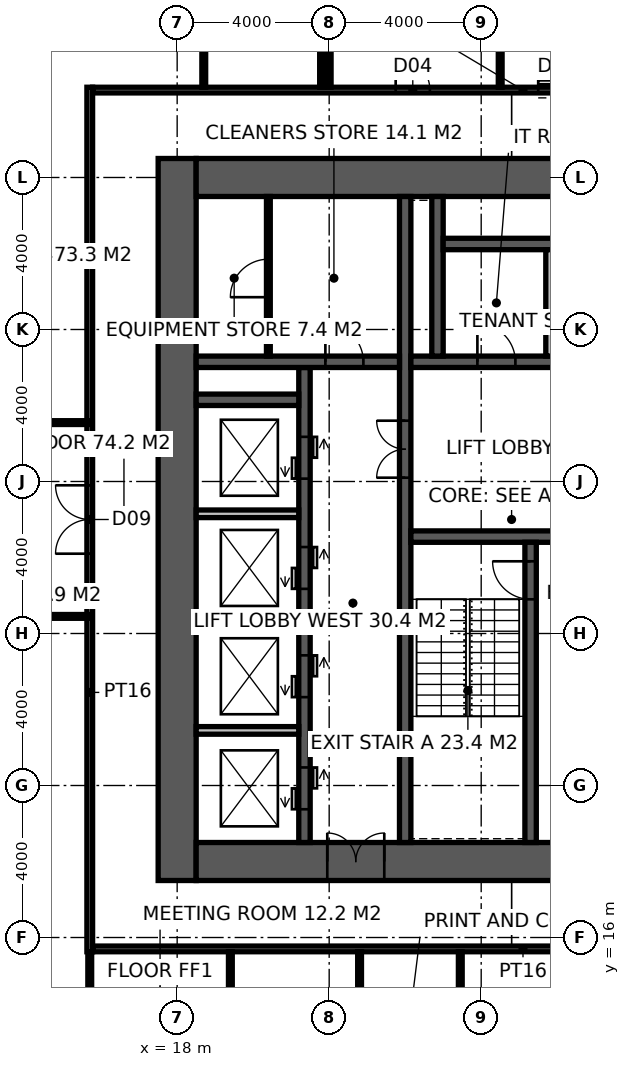
"""IFC4 building model, lengths in metres.
Left out: names, types, materials, properties, quantities, classifications, styles, units other than length and angle.
Written with IfcOpenShell. Run it as: python <this file> out.ifc"""

import sys

from ifc_helpers import new_model, si_unit, direction, frame, frame_2d, origin, place, context, subcontext, project, spatial, rectangle, extrude, element, fill, save


model = new_model("IFC4")
c1 = context("Model", 3, precision=1e-05, world=origin(), true_north=direction((0.0, 1.0)))
c2 = subcontext(c1, "Body", "Model", "MODEL_VIEW")
j1 = project(units=[si_unit("LENGTHUNIT", "METRE"), si_unit("PLANEANGLEUNIT", "RADIAN")], contexts=[c1])
p1 = place(None, origin())
s1 = spatial("IfcSite", under=j1, at=p1, CompositionType="ELEMENT")
p2 = place(p1, origin())
s2 = spatial("IfcBuilding", under=s1, at=p2, CompositionType="ELEMENT")
p3 = place(p2, frame((0.0, 0.0, 226.2)))
s3 = spatial("IfcBuildingStorey", under=s2, at=p3, CompositionType="ELEMENT", Elevation=226.2)
p4 = place(p3, frame((18.0, 17.5, -0.15), z_axis=(0.0, 0.0, 1.0), x_axis=(0.0, 1.0, 0.0)))
e1 = element("IfcWall", 1, at=p4, inside=s3, PredefinedType="SHEAR", context=c2, shape_type="SweptSolid", body=[
    extrude(rectangle(XDim=19.0, YDim=1.0, at=frame_2d((9.5, 0.0))), origin(), (0.0, 0.0, 1.0), 4.0),
])
p5 = place(p3, frame((18.5, 18.0, -0.15), z_axis=(0.0, 0.0, 1.0), x_axis=(1.0, 0.0, 0.0)))
e2 = element("IfcWall", 2, at=p5, inside=s3, PredefinedType="SHEAR", context=c2, shape_type="SweptSolid", body=[
    extrude(rectangle(XDim=17.6, YDim=1.0, at=frame_2d((8.8, 0.0))), origin(), (0.0, 0.0, 1.0), 4.0),
])
p6 = place(p5, frame((3.45, 0.0, 0.15)))
e3 = element("IfcOpeningElement", 3, at=p6, cuts=e2, PredefinedType="OPENING", context=c2, shape_type="SweptSolid", body=[
    extrude(rectangle(XDim=1.5, YDim=2.4, at=frame_2d((0.75, 1.2))), frame((0.0, 0.51, 0.0), z_axis=(0.0, -1.0, 0.0), x_axis=(1.0, 0.0, 0.0)), (0.0, 0.0, 1.0), 1.02),
])
p7 = place(p3, frame((18.5, 36.0, -0.15), z_axis=(0.0, 0.0, 1.0), x_axis=(1.0, 0.0, 0.0)))
e4 = element("IfcWall", 4, at=p7, inside=s3, PredefinedType="SHEAR", context=c2, shape_type="SweptSolid", body=[
    extrude(rectangle(XDim=17.6, YDim=1.0, at=frame_2d((8.8, 0.0))), origin(), (0.0, 0.0, 1.0), 4.0),
])
p8 = place(p3, frame((24.0, 18.5, -0.15), z_axis=(0.0, 0.0, 1.0), x_axis=(0.0, 1.0, 0.0)))
e5 = element("IfcWall", 5, at=p8, inside=s3, PredefinedType="SHEAR", context=c2, shape_type="SweptSolid", body=[
    extrude(rectangle(XDim=17.0, YDim=0.3, at=frame_2d((8.5, 0.0))), origin(), (0.0, 0.0, 1.0), 4.0),
])
p9 = place(p8, frame((9.6, 0.0, 0.15)))
e6 = element("IfcOpeningElement", 6, at=p9, cuts=e5, PredefinedType="OPENING", context=c2, shape_type="SweptSolid", body=[
    extrude(rectangle(XDim=1.5, YDim=2.4, at=frame_2d((0.75, 1.2))), frame((0.0, 0.16, 0.0), z_axis=(0.0, -1.0, 0.0), x_axis=(1.0, 0.0, 0.0)), (0.0, 0.0, 1.0), 0.32),
])
p10 = place(p3, frame((24.15, 26.55, -0.15), z_axis=(0.0, 0.0, 1.0), x_axis=(1.0, 0.0, 0.0)))
e7 = element("IfcWall", 7, at=p10, inside=s3, PredefinedType="SHEAR", context=c2, shape_type="SweptSolid", body=[
    extrude(rectangle(XDim=11.25, YDim=0.3, at=frame_2d((5.625, 0.0))), origin(), (0.0, 0.0, 1.0), 4.0),
])
p11 = place(p10, frame((9.25, 0.0, 0.15)))
e8 = element("IfcOpeningElement", 8, at=p11, cuts=e7, PredefinedType="OPENING", context=c2, shape_type="SweptSolid", body=[
    extrude(rectangle(XDim=1.0, YDim=2.2, at=frame_2d((0.5, 1.1))), frame((0.0, 0.16, 0.0), z_axis=(0.0, -1.0, 0.0), x_axis=(1.0, 0.0, 0.0)), (0.0, 0.0, 1.0), 0.32),
])
p12 = place(p10, frame((4.9, 0.0, 0.15)))
e9 = element("IfcOpeningElement", 9, at=p12, cuts=e7, PredefinedType="OPENING", context=c2, shape_type="SweptSolid", body=[
    extrude(rectangle(XDim=1.5, YDim=2.4, at=frame_2d((0.75, 1.2))), frame((0.0, 0.16, 0.0), z_axis=(0.0, -1.0, 0.0), x_axis=(1.0, 0.0, 0.0)), (0.0, 0.0, 1.0), 0.32),
])
p13 = place(p3, frame((27.3, 18.5, -0.15), z_axis=(0.0, 0.0, 1.0), x_axis=(0.0, 1.0, 0.0)))
e10 = element("IfcWall", 10, at=p13, inside=s3, PredefinedType="SHEAR", context=c2, shape_type="SweptSolid", body=[
    extrude(rectangle(XDim=7.9, YDim=0.3, at=frame_2d((3.95, 0.0))), origin(), (0.0, 0.0, 1.0), 4.0),
])
p14 = place(p13, frame((6.4, 0.0, 0.15)))
e11 = element("IfcOpeningElement", 11, at=p14, cuts=e10, PredefinedType="OPENING", context=c2, shape_type="SweptSolid", body=[
    extrude(rectangle(XDim=1.0, YDim=2.2, at=frame_2d((0.5, 1.1))), frame((0.0, 0.16, 0.0), z_axis=(0.0, -1.0, 0.0), x_axis=(1.0, 0.0, 0.0)), (0.0, 0.0, 1.0), 0.32),
])
p15 = place(p3, frame((24.15, 31.15, -0.15), z_axis=(0.0, 0.0, 1.0), x_axis=(1.0, 0.0, 0.0)))
e12 = element("IfcWall", 12, at=p15, inside=s3, PredefinedType="SHEAR", context=c2, shape_type="SweptSolid", body=[
    extrude(rectangle(XDim=11.25, YDim=0.3, at=frame_2d((5.625, 0.0))), origin(), (0.0, 0.0, 1.0), 4.0),
])
p16 = place(p15, frame((1.75, 0.0, 0.15)))
e13 = element("IfcOpeningElement", 13, at=p16, cuts=e12, PredefinedType="OPENING", context=c2, shape_type="SweptSolid", body=[
    extrude(rectangle(XDim=1.0, YDim=2.2, at=frame_2d((0.5, 1.1))), frame((0.0, 0.16, 0.0), z_axis=(0.0, -1.0, 0.0), x_axis=(1.0, 0.0, 0.0)), (0.0, 0.0, 1.0), 0.32),
])
p17 = place(p15, frame((4.55, 0.0, 0.15)))
e14 = element("IfcOpeningElement", 14, at=p17, cuts=e12, PredefinedType="OPENING", context=c2, shape_type="SweptSolid", body=[
    extrude(rectangle(XDim=1.0, YDim=2.2, at=frame_2d((0.5, 1.1))), frame((0.0, 0.16, 0.0), z_axis=(0.0, -1.0, 0.0), x_axis=(1.0, 0.0, 0.0)), (0.0, 0.0, 1.0), 0.32),
])
p18 = place(p15, frame((7.25, 0.0, 0.15)))
e15 = element("IfcOpeningElement", 15, at=p18, cuts=e12, PredefinedType="OPENING", context=c2, shape_type="SweptSolid", body=[
    extrude(rectangle(XDim=1.4, YDim=2.4, at=frame_2d((0.7, 1.2))), frame((0.0, 0.16, 0.0), z_axis=(0.0, -1.0, 0.0), x_axis=(1.0, 0.0, 0.0)), (0.0, 0.0, 1.0), 0.32),
])
p19 = place(p3, frame((21.35, 18.5, -0.15), z_axis=(0.0, 0.0, 1.0), x_axis=(0.0, 1.0, 0.0)))
e16 = element("IfcWall", 16, at=p19, inside=s3, PredefinedType="SHEAR", context=c2, shape_type="SweptSolid", body=[
    extrude(rectangle(XDim=12.5, YDim=0.3, at=frame_2d((6.25, 0.0))), origin(), (0.0, 0.0, 1.0), 4.0),
])
p20 = place(p19, frame((0.875, 0.0, 0.15)))
e17 = element("IfcOpeningElement", 17, at=p20, cuts=e16, PredefinedType="OPENING", context=c2, shape_type="SweptSolid", body=[
    extrude(rectangle(XDim=1.1, YDim=2.2, at=frame_2d((0.55, 1.1))), frame((0.0, 0.16, 0.0), z_axis=(0.0, -1.0, 0.0), x_axis=(1.0, 0.0, 0.0)), (0.0, 0.0, 1.0), 0.32),
])
p21 = place(p19, frame((3.825, 0.0, 0.15)))
e18 = element("IfcOpeningElement", 18, at=p21, cuts=e16, PredefinedType="OPENING", context=c2, shape_type="SweptSolid", body=[
    extrude(rectangle(XDim=1.1, YDim=2.2, at=frame_2d((0.55, 1.1))), frame((0.0, 0.16, 0.0), z_axis=(0.0, -1.0, 0.0), x_axis=(1.0, 0.0, 0.0)), (0.0, 0.0, 1.0), 0.32),
])
p22 = place(p19, frame((6.675, 0.0, 0.15)))
e19 = element("IfcOpeningElement", 19, at=p22, cuts=e16, PredefinedType="OPENING", context=c2, shape_type="SweptSolid", body=[
    extrude(rectangle(XDim=1.1, YDim=2.2, at=frame_2d((0.55, 1.1))), frame((0.0, 0.16, 0.0), z_axis=(0.0, -1.0, 0.0), x_axis=(1.0, 0.0, 0.0)), (0.0, 0.0, 1.0), 0.32),
])
p23 = place(p19, frame((9.575, 0.0, 0.15)))
e20 = element("IfcOpeningElement", 20, at=p23, cuts=e16, PredefinedType="OPENING", context=c2, shape_type="SweptSolid", body=[
    extrude(rectangle(XDim=1.1, YDim=2.2, at=frame_2d((0.55, 1.1))), frame((0.0, 0.16, 0.0), z_axis=(0.0, -1.0, 0.0), x_axis=(1.0, 0.0, 0.0)), (0.0, 0.0, 1.0), 0.32),
])
p24 = place(p3, frame((18.5, 31.15, -0.15), z_axis=(0.0, 0.0, 1.0), x_axis=(1.0, 0.0, 0.0)))
e21 = element("IfcWall", 21, at=p24, inside=s3, PredefinedType="SHEAR", context=c2, shape_type="SweptSolid", body=[
    extrude(rectangle(XDim=5.35, YDim=0.3, at=frame_2d((2.675, 0.0))), origin(), (0.0, 0.0, 1.0), 4.0),
])
p25 = place(p24, frame((3.4, 0.0, 0.15)))
e22 = element("IfcOpeningElement", 22, at=p25, cuts=e21, PredefinedType="OPENING", context=c2, shape_type="SweptSolid", body=[
    extrude(rectangle(XDim=1.0, YDim=2.2, at=frame_2d((0.5, 1.1))), frame((0.0, 0.16, 0.0), z_axis=(0.0, -1.0, 0.0), x_axis=(1.0, 0.0, 0.0)), (0.0, 0.0, 1.0), 0.32),
])
p26 = place(p3, frame((18.5, 30.15, -0.15), z_axis=(0.0, 0.0, 1.0), x_axis=(1.0, 0.0, 0.0)))
e23 = element("IfcWall", 23, at=p26, inside=s3, PredefinedType="SHEAR", context=c2, shape_type="SweptSolid", body=[
    extrude(rectangle(XDim=2.7, YDim=0.3, at=frame_2d((1.35, 0.0))), origin(), (0.0, 0.0, 1.0), 4.0),
])
p27 = place(p3, frame((24.85, 31.3, -0.15), z_axis=(0.0, 0.0, 1.0), x_axis=(0.0, 1.0, 0.0)))
e24 = element("IfcWall", 24, at=p27, inside=s3, PredefinedType="SHEAR", context=c2, shape_type="SweptSolid", body=[
    extrude(rectangle(XDim=4.2, YDim=0.3, at=frame_2d((2.1, 0.0))), origin(), (0.0, 0.0, 1.0), 4.0),
])
p28 = place(p3, frame((25.0, 34.25, -0.15), z_axis=(0.0, 0.0, 1.0), x_axis=(1.0, 0.0, 0.0)))
e25 = element("IfcWall", 25, at=p28, inside=s3, PredefinedType="SHEAR", context=c2, shape_type="SweptSolid", body=[
    extrude(rectangle(XDim=8.6, YDim=0.3, at=frame_2d((4.3, 0.0))), origin(), (0.0, 0.0, 1.0), 4.0),
])
p29 = place(p3, frame((27.8, 31.3, 0.0), z_axis=(0.0, 0.0, 1.0), x_axis=(0.0, 1.0, 0.0)))
e26 = element("IfcWall", 26, at=p29, inside=s3, PredefinedType="SOLIDWALL", context=c2, shape_type="SweptSolid", body=[
    extrude(rectangle(XDim=2.8, YDim=0.2, at=frame_2d((1.4, 0.0))), origin(), (0.0, 0.0, 1.0), 3.85),
])
for number, where, z_axis, x_axis in (
    (27, (18.5, 21.45, -0.15), (0.0, 0.0, 1.0), (1.0, 0.0, 0.0)),
    (28, (18.5, 24.3, -0.15), (0.0, 0.0, 1.0), (1.0, 0.0, 0.0)),
    (29, (18.5, 27.15, -0.15), (0.0, 0.0, 1.0), (1.0, 0.0, 0.0)),
):
    element("IfcWall", number, at=place(p3, frame(where, z_axis=z_axis, x_axis=x_axis)), inside=s3, PredefinedType="SOLIDWALL", context=c2, shape_type="SweptSolid", body=[
        extrude(rectangle(XDim=2.7, YDim=0.2, at=frame_2d((1.35, 0.0))), origin(), (0.0, 0.0, 1.0), 4.0),
    ])
p30 = place(p3, frame((20.4, 31.3, 0.0), z_axis=(0.0, 0.0, 1.0), x_axis=(0.0, 1.0, 0.0)))
e30 = element("IfcWall", 30, at=p30, inside=s3, PredefinedType="PARTITIONING", context=c2, shape_type="SweptSolid", body=[
    extrude(rectangle(XDim=4.2, YDim=0.1, at=frame_2d((2.1, 0.0))), origin(), (0.0, 0.0, 1.0), 3.85),
])
p31 = place(p30, frame((1.55, 0.0, 0.0)))
e31 = element("IfcOpeningElement", 31, at=p31, cuts=e30, PredefinedType="OPENING", context=c2, shape_type="SweptSolid", body=[
    extrude(rectangle(XDim=1.0, YDim=2.2, at=frame_2d((0.5, 1.1))), frame((0.0, 0.06, 0.0), z_axis=(0.0, -1.0, 0.0), x_axis=(1.0, 0.0, 0.0)), (0.0, 0.0, 1.0), 0.12),
])
p32 = place(p3, frame((15.7, 15.625, 0.0), z_axis=(0.0, 0.0, 1.0), x_axis=(0.0, 1.0, 0.0)))
e32 = element("IfcWall", 32, at=p32, inside=s3, PredefinedType="PARTITIONING", context=c2, shape_type="SweptSolid", body=[
    extrude(rectangle(XDim=22.75, YDim=0.15, at=frame_2d((11.375, 0.0))), origin(), (0.0, 0.0, 1.0), 3.85),
])
p33 = place(p32, frame((10.475, 0.0, 0.0)))
e33 = element("IfcOpeningElement", 33, at=p33, cuts=e32, PredefinedType="OPENING", context=c2, shape_type="SweptSolid", body=[
    extrude(rectangle(XDim=1.8, YDim=2.4, at=frame_2d((0.9, 1.2))), frame((0.0, 0.085, 0.0), z_axis=(0.0, -1.0, 0.0), x_axis=(1.0, 0.0, 0.0)), (0.0, 0.0, 1.0), 0.17),
])
p34 = place(p3, frame((15.775, 15.7, 0.0), z_axis=(0.0, 0.0, 1.0), x_axis=(1.0, 0.0, 0.0)))
e34 = element("IfcWall", 34, at=p34, inside=s3, PredefinedType="PARTITIONING", context=c2, shape_type="SweptSolid", body=[
    extrude(rectangle(XDim=22.65, YDim=0.15, at=frame_2d((11.325, 0.0))), origin(), (0.0, 0.0, 1.0), 3.85),
])
p35 = place(p3, frame((15.775, 38.3, 0.0), z_axis=(0.0, 0.0, 1.0), x_axis=(1.0, 0.0, 0.0)))
e35 = element("IfcWall", 35, at=p35, inside=s3, PredefinedType="PARTITIONING", context=c2, shape_type="SweptSolid", body=[
    extrude(rectangle(XDim=22.65, YDim=0.15, at=frame_2d((11.325, 0.0))), origin(), (0.0, 0.0, 1.0), 3.85),
])
p36 = place(p35, frame((7.975, 0.0, 0.0)))
e36 = element("IfcOpeningElement", 36, at=p36, cuts=e35, PredefinedType="OPENING", context=c2, shape_type="SweptSolid", body=[
    extrude(rectangle(XDim=0.9, YDim=2.1, at=frame_2d((0.45, 1.05))), frame((0.0, 0.085, 0.0), z_axis=(0.0, -1.0, 0.0), x_axis=(1.0, 0.0, 0.0)), (0.0, 0.0, 1.0), 0.17),
])
p37 = place(p35, frame((11.725, 0.0, 0.0)))
e37 = element("IfcOpeningElement", 37, at=p37, cuts=e35, PredefinedType="OPENING", context=c2, shape_type="SweptSolid", body=[
    extrude(rectangle(XDim=1.0, YDim=2.1, at=frame_2d((0.5, 1.05))), frame((0.0, 0.085, 0.0), z_axis=(0.0, -1.0, 0.0), x_axis=(1.0, 0.0, 0.0)), (0.0, 0.0, 1.0), 0.17),
])
p38 = place(p35, frame((15.575, 0.0, 0.0)))
e38 = element("IfcOpeningElement", 38, at=p38, cuts=e35, PredefinedType="OPENING", context=c2, shape_type="SweptSolid", body=[
    extrude(rectangle(XDim=0.9, YDim=2.1, at=frame_2d((0.45, 1.05))), frame((0.0, 0.085, 0.0), z_axis=(0.0, -1.0, 0.0), x_axis=(1.0, 0.0, 0.0)), (0.0, 0.0, 1.0), 0.17),
])
p39 = place(p3, frame((22.0, 38.375, 0.0), z_axis=(0.0, 0.0, 1.0), x_axis=(0.0, 1.0, 0.0)))
e39 = element("IfcWall", 39, at=p39, inside=s3, PredefinedType="PARTITIONING", context=c2, shape_type="SweptSolid", body=[
    extrude(rectangle(XDim=3.675, YDim=0.1, at=frame_2d((1.837, 0.0))), origin(), (0.0, 0.0, 1.0), 2.95),
])
p40 = place(p3, frame((26.5, 38.375, 0.0), z_axis=(0.0, 0.0, 1.0), x_axis=(0.0, 1.0, 0.0)))
e40 = element("IfcWall", 40, at=p40, inside=s3, PredefinedType="PARTITIONING", context=c2, shape_type="SweptSolid", body=[
    extrude(rectangle(XDim=3.575, YDim=0.1, at=frame_2d((1.788, 0.0))), origin(), (0.0, 0.0, 1.0), 3.85),
])
p41 = place(p3, frame((15.7, 12.15, 0.0), z_axis=(0.0, 0.0, 1.0), x_axis=(0.0, 1.0, 0.0)))
e41 = element("IfcWall", 41, at=p41, inside=s3, PredefinedType="PARTITIONING", context=c2, shape_type="SweptSolid", body=[
    extrude(rectangle(XDim=3.475, YDim=0.1, at=frame_2d((1.738, 0.0))), origin(), (0.0, 0.0, 1.0), 3.85),
])
p42 = place(p3, frame((18.7, 38.375, 0.0), z_axis=(0.0, 0.0, 1.0), x_axis=(0.0, 1.0, 0.0)))
e42 = element("IfcWall", 42, at=p42, inside=s3, PredefinedType="PARTITIONING", context=c2, shape_type="SweptSolid", body=[
    extrude(rectangle(XDim=4.075, YDim=0.1, at=frame_2d((2.038, 0.0))), origin(), (0.0, 0.0, 1.0), 3.85),
])
p43 = place(p3, frame((19.4, 12.15, 0.0), z_axis=(0.0, 0.0, 1.0), x_axis=(0.0, 1.0, 0.0)))
e43 = element("IfcWall", 43, at=p43, inside=s3, PredefinedType="PARTITIONING", context=c2, shape_type="SweptSolid", body=[
    extrude(rectangle(XDim=3.475, YDim=0.1, at=frame_2d((1.738, 0.0))), origin(), (0.0, 0.0, 1.0), 3.85),
])
p44 = place(p3, frame((21.8, 38.375, 0.0), z_axis=(0.0, 0.0, 1.0), x_axis=(0.0, 1.0, 0.0)))
e44 = element("IfcWall", 44, at=p44, inside=s3, PredefinedType="PARTITIONING", context=c2, shape_type="SweptSolid", body=[
    extrude(rectangle(XDim=4.075, YDim=0.1, at=frame_2d((2.038, 0.0))), origin(), (0.0, 0.0, 1.0), 2.95),
])
for number, where, z_axis, x_axis in (
    (45, (22.8, 12.15, 0.0), (0.0, 0.0, 1.0), (0.0, 1.0, 0.0)),
    (46, (25.45, 12.15, 0.0), (0.0, 0.0, 1.0), (0.0, 1.0, 0.0)),
):
    element("IfcWall", number, at=place(p3, frame(where, z_axis=z_axis, x_axis=x_axis)), inside=s3, PredefinedType="PARTITIONING", context=c2, shape_type="SweptSolid", body=[
        extrude(rectangle(XDim=3.475, YDim=0.1, at=frame_2d((1.738, 0.0))), origin(), (0.0, 0.0, 1.0), 3.85),
    ])
p45 = place(p3, frame((15.7, 29.55, 0.0), z_axis=(0.0, 0.0, 1.0), x_axis=(-1.0, 0.0, 0.0)))
e47 = element("IfcWall", 47, at=p45, inside=s3, PredefinedType="PARTITIONING", context=c2, shape_type="SweptSolid", body=[
    extrude(rectangle(XDim=4.5, YDim=0.1, at=frame_2d((2.25, 0.0))), origin(), (0.0, 0.0, 1.0), 3.85),
])
p46 = place(p3, frame((11.2, 24.45, 0.0), z_axis=(0.0, 0.0, 1.0), x_axis=(1.0, 0.0, 0.0)))
e48 = element("IfcWall", 48, at=p46, inside=s3, PredefinedType="PARTITIONING", context=c2, shape_type="SweptSolid", body=[
    extrude(rectangle(XDim=4.5, YDim=0.1, at=frame_2d((2.25, 0.0))), origin(), (0.0, 0.0, 1.0), 2.95),
])
p47 = place(p14, origin())
e49 = element("IfcDoor", 49, at=p47, inside=s3, OperationType="SINGLE_SWING_RIGHT", PredefinedType="DOOR", context=c2, shape_type="SweptSolid", body=[
    extrude(rectangle(XDim=1.0, YDim=2.2, at=frame_2d((0.5, 1.1))), frame((0.0, 0.025, 0.0), z_axis=(0.0, -1.0, 0.0), x_axis=(1.0, 0.0, 0.0)), (0.0, 0.0, 1.0), 0.05),
])
fill(e11, e49)
p48 = place(p9, origin())
e50 = element("IfcDoor", 50, at=p48, inside=s3, OperationType="DOUBLE_DOOR_DOUBLE_SWING", PredefinedType="DOOR", context=c2, shape_type="SweptSolid", body=[
    extrude(rectangle(XDim=1.5, YDim=2.4, at=frame_2d((0.75, 1.2))), frame((0.0, 0.025, 0.0), z_axis=(0.0, -1.0, 0.0), x_axis=(1.0, 0.0, 0.0)), (0.0, 0.0, 1.0), 0.05),
])
fill(e6, e50)
p49 = place(p25, origin())
e51 = element("IfcDoor", 51, at=p49, inside=s3, OperationType="SINGLE_SWING_LEFT", PredefinedType="DOOR", context=c2, shape_type="SweptSolid", body=[
    extrude(rectangle(XDim=1.0, YDim=2.2, at=frame_2d((0.5, 1.1))), frame((0.0, 0.025, 0.0), z_axis=(0.0, -1.0, 0.0), x_axis=(1.0, 0.0, 0.0)), (0.0, 0.0, 1.0), 0.05),
])
fill(e22, e51)
p50 = place(p31, origin())
e52 = element("IfcDoor", 52, at=p50, inside=s3, OperationType="SINGLE_SWING_LEFT", PredefinedType="DOOR", context=c2, shape_type="SweptSolid", body=[
    extrude(rectangle(XDim=1.0, YDim=2.2, at=frame_2d((0.5, 1.1))), frame((0.0, 0.025, 0.0), z_axis=(0.0, -1.0, 0.0), x_axis=(1.0, 0.0, 0.0)), (0.0, 0.0, 1.0), 0.05),
])
fill(e31, e52)
p51 = place(p16, origin())
e53 = element("IfcDoor", 53, at=p51, inside=s3, OperationType="SINGLE_SWING_LEFT", PredefinedType="DOOR", context=c2, shape_type="SweptSolid", body=[
    extrude(rectangle(XDim=1.0, YDim=2.2, at=frame_2d((0.5, 1.1))), frame((0.0, 0.025, 0.0), z_axis=(0.0, -1.0, 0.0), x_axis=(1.0, 0.0, 0.0)), (0.0, 0.0, 1.0), 0.05),
])
fill(e13, e53)
p52 = place(p6, origin())
e54 = element("IfcDoor", 54, at=p52, inside=s3, OperationType="DOUBLE_DOOR_DOUBLE_SWING", PredefinedType="DOOR", context=c2, shape_type="SweptSolid", body=[
    extrude(rectangle(XDim=1.5, YDim=2.4, at=frame_2d((0.75, 1.2))), frame((0.0, 0.025, 0.0), z_axis=(0.0, -1.0, 0.0), x_axis=(1.0, 0.0, 0.0)), (0.0, 0.0, 1.0), 0.05),
])
fill(e3, e54)
p53 = place(p36, origin())
e55 = element("IfcDoor", 55, at=p53, inside=s3, OperationType="SINGLE_SWING_LEFT", PredefinedType="DOOR", context=c2, shape_type="SweptSolid", body=[
    extrude(rectangle(XDim=0.9, YDim=2.1, at=frame_2d((0.45, 1.05))), frame((0.0, 0.025, 0.0), z_axis=(0.0, -1.0, 0.0), x_axis=(1.0, 0.0, 0.0)), (0.0, 0.0, 1.0), 0.05),
])
fill(e36, e55)
p54 = place(p37, origin())
e56 = element("IfcDoor", 56, at=p54, inside=s3, OperationType="SLIDING_TO_LEFT", PredefinedType="DOOR", context=c2, shape_type="SweptSolid", body=[
    extrude(rectangle(XDim=1.0, YDim=2.1, at=frame_2d((0.5, 1.05))), frame((0.0, 0.025, 0.0), z_axis=(0.0, -1.0, 0.0), x_axis=(1.0, 0.0, 0.0)), (0.0, 0.0, 1.0), 0.05),
])
fill(e37, e56)
p55 = place(p33, origin())
e57 = element("IfcDoor", 57, at=p55, inside=s3, OperationType="DOUBLE_DOOR_DOUBLE_SWING", PredefinedType="DOOR", context=c2, shape_type="SweptSolid", body=[
    extrude(rectangle(XDim=1.8, YDim=2.4, at=frame_2d((0.9, 1.2))), frame((0.0, 0.025, 0.0), z_axis=(0.0, -1.0, 0.0), x_axis=(1.0, 0.0, 0.0)), (0.0, 0.0, 1.0), 0.05),
])
fill(e33, e57)
p56 = place(p20, origin())
e58 = element("IfcDoor", 58, at=p56, inside=s3, OperationType="DOUBLE_DOOR_SLIDING", PredefinedType="DOOR", context=c2, shape_type="SweptSolid", body=[
    extrude(rectangle(XDim=1.1, YDim=2.2, at=frame_2d((0.55, 1.1))), frame((0.0, 0.025, 0.0), z_axis=(0.0, -1.0, 0.0), x_axis=(1.0, 0.0, 0.0)), (0.0, 0.0, 1.0), 0.05),
])
fill(e17, e58)
p57 = place(p21, origin())
e59 = element("IfcDoor", 59, at=p57, inside=s3, OperationType="DOUBLE_DOOR_SLIDING", PredefinedType="DOOR", context=c2, shape_type="SweptSolid", body=[
    extrude(rectangle(XDim=1.1, YDim=2.2, at=frame_2d((0.55, 1.1))), frame((0.0, 0.025, 0.0), z_axis=(0.0, -1.0, 0.0), x_axis=(1.0, 0.0, 0.0)), (0.0, 0.0, 1.0), 0.05),
])
fill(e18, e59)
p58 = place(p22, origin())
e60 = element("IfcDoor", 60, at=p58, inside=s3, OperationType="DOUBLE_DOOR_SLIDING", PredefinedType="DOOR", context=c2, shape_type="SweptSolid", body=[
    extrude(rectangle(XDim=1.1, YDim=2.2, at=frame_2d((0.55, 1.1))), frame((0.0, 0.025, 0.0), z_axis=(0.0, -1.0, 0.0), x_axis=(1.0, 0.0, 0.0)), (0.0, 0.0, 1.0), 0.05),
])
fill(e19, e60)
p59 = place(p23, origin())
e61 = element("IfcDoor", 61, at=p59, inside=s3, OperationType="DOUBLE_DOOR_SLIDING", PredefinedType="DOOR", context=c2, shape_type="SweptSolid", body=[
    extrude(rectangle(XDim=1.1, YDim=2.2, at=frame_2d((0.55, 1.1))), frame((0.0, 0.025, 0.0), z_axis=(0.0, -1.0, 0.0), x_axis=(1.0, 0.0, 0.0)), (0.0, 0.0, 1.0), 0.05),
])
fill(e20, e61)
save(model, sys.argv[1])
